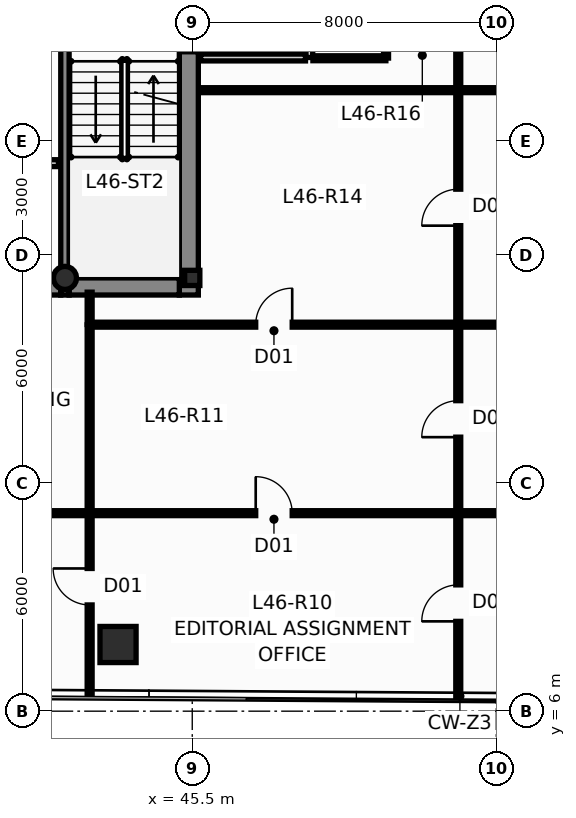
"""IFC4 building model, lengths in metres.
Left out: names, types, materials, properties, quantities, classifications, styles, units other than length and angle.
Written with IfcOpenShell. Run it as: python <this file> out.ifc"""

import sys

from ifc_helpers import new_model, si_unit, direction, frame, frame_2d, origin, origin_2d, place, context, subcontext, project, spatial, rectangle, hollow_rectangle, hollow_circle, i_section, extrude, source, transform, mapped, element, fill, save


model = new_model("IFC4")
c1 = context("Model", 3, precision=1e-05, world=origin(), true_north=direction((0.0, 1.0)))
c2 = subcontext(c1, "Body", "Model", "MODEL_VIEW")
j1 = project(units=[si_unit("LENGTHUNIT", "METRE"), si_unit("PLANEANGLEUNIT", "RADIAN")], contexts=[c1])
p1 = place(None, origin())
s1 = spatial("IfcSite", under=j1, at=p1, CompositionType="ELEMENT")
p2 = place(p1, origin())
s2 = spatial("IfcBuilding", under=s1, at=p2, CompositionType="ELEMENT")
p3 = place(p2, frame((0.0, 0.0, 176.75)))
s3 = spatial("IfcBuildingStorey", under=s2, at=p3, CompositionType="ELEMENT", Elevation=176.75)
m1 = source(origin(), c2, "Body", "SweptSolid", [
    extrude(i_section(OverallWidth=0.4, OverallDepth=0.4, WebThickness=0.02, FlangeThickness=0.032, at=origin_2d()), origin(), (0.0, 0.0, 1.0), 3.65),
])
p4 = place(p3, frame((45.5, 17.4, 0.0), z_axis=(0.0, 0.0, 1.0), x_axis=(1.0, 0.0, 0.0)))
e1 = element("IfcColumn", 1, at=p4, inside=s3, PredefinedType="COLUMN", context=c2, shape_type="MappedRepresentation", body=[
    mapped(m1, transform((0.0, 0.0, 0.0), scale=1.0)),
])
m2 = source(origin(), c2, "Body", "SweptSolid", [
    extrude(hollow_circle(Radius=0.305, WallThickness=0.025, at=origin_2d()), origin(), (0.0, 0.0, 1.0), 3.65),
])
p5 = place(p3, frame((42.15, 17.4, 0.0), z_axis=(0.0, 0.0, 1.0), x_axis=(1.0, 0.0, 0.0)))
e2 = element("IfcColumn", 2, at=p5, inside=s3, PredefinedType="COLUMN", context=c2, shape_type="MappedRepresentation", body=[
    mapped(m2, transform((0.0, 0.0, 0.0), scale=1.0)),
])
p6 = place(p3, frame((45.41, 16.95, 0.0), z_axis=(0.0, 0.0, 1.0), x_axis=(0.0, 1.0, 0.0)))
e3 = element("IfcWall", 3, at=p6, inside=s3, PredefinedType="SHEAR", context=c2, shape_type="SweptSolid", body=[
    extrude(rectangle(XDim=13.275, YDim=0.5, at=frame_2d((6.638, 0.0))), origin(), (0.0, 0.0, 1.0), 3.65),
])
p7 = place(p6, frame((6.4, 0.0, 0.0)))
e4 = element("IfcOpeningElement", 4, at=p7, cuts=e3, PredefinedType="OPENING", context=c2, shape_type="SweptSolid", body=[
    extrude(rectangle(XDim=1.12, YDim=2.15, at=frame_2d((0.56, 1.075))), frame((0.0, 0.262, 0.0), z_axis=(0.0, -1.0, 0.0), x_axis=(1.0, 0.0, 0.0)), (0.0, 0.0, 1.0), 0.524),
])
p8 = place(p6, frame((10.85, 0.0, 0.0)))
e5 = element("IfcOpeningElement", 5, at=p8, cuts=e3, PredefinedType="OPENING", context=c2, shape_type="SweptSolid", body=[
    extrude(rectangle(XDim=1.2, YDim=2.2, at=frame_2d((0.6, 1.1))), frame((0.0, 0.262, 0.0), z_axis=(0.0, -1.0, 0.0), x_axis=(1.0, 0.0, 0.0)), (0.0, 0.0, 1.0), 0.524),
])
p9 = place(p3, frame((33.96, 17.175, 0.0), z_axis=(0.0, 0.0, 1.0), x_axis=(1.0, 0.0, 0.0)))
e6 = element("IfcWall", 6, at=p9, inside=s3, PredefinedType="SHEAR", context=c2, shape_type="SweptSolid", body=[
    extrude(rectangle(XDim=8.08, YDim=0.45, at=frame_2d((4.04, 0.0))), origin(), (0.0, 0.0, 1.0), 3.65),
])
p10 = place(p3, frame((42.26, 17.175, 0.0), z_axis=(0.0, 0.0, 1.0), x_axis=(1.0, 0.0, 0.0)))
e7 = element("IfcWall", 7, at=p10, inside=s3, PredefinedType="SHEAR", context=c2, shape_type="SweptSolid", body=[
    extrude(rectangle(XDim=2.9, YDim=0.45, at=frame_2d((1.45, 0.0))), origin(), (0.0, 0.0, 1.0), 3.65),
])
p11 = place(p3, frame((42.15, 16.95, 0.0), z_axis=(0.0, 0.0, 1.0), x_axis=(0.0, 1.0, 0.0)))
e8 = element("IfcWall", 8, at=p11, inside=s3, PredefinedType="SHEAR", context=c2, shape_type="SweptSolid", body=[
    extrude(rectangle(XDim=13.275, YDim=0.22, at=frame_2d((6.638, 0.0))), origin(), (0.0, 0.0, 1.0), 3.65),
])
m3 = source(origin(), c2, "Body", "SweptSolid", [
    extrude(hollow_rectangle(XDim=0.95, YDim=0.95, WallThickness=0.05, at=origin_2d()), origin(), (0.0, 0.0, 1.0), 3.651),
])
p12 = place(p3, frame((43.547, 7.754, 0.0), z_axis=(0.004480682206, 0.019795252729, 0.999794014513), x_axis=(-0.975326687046, 0.220766513622, 0.0)))
e9 = element("IfcColumn", 9, at=p12, inside=s3, PredefinedType="COLUMN", context=c2, shape_type="MappedRepresentation", body=[
    mapped(m3, transform((0.0, 0.0, 0.0), scale=1.0)),
])
p13 = place(p3, frame((48.58, 23.2, 0.0), z_axis=(0.0, 0.0, 1.0), x_axis=(0.0, 1.0, 0.0)))
e10 = element("IfcWall", 10, at=p13, inside=s3, PredefinedType="PARTITIONING", context=c2, shape_type="SweptSolid", body=[
    extrude(rectangle(XDim=6.4, YDim=0.18, at=frame_2d((3.2, 0.0))), origin(), (0.0, 0.0, 1.0), 3.078),
])
p14 = place(p13, frame((2.65, 0.0, 0.0)))
e11 = element("IfcOpeningElement", 11, at=p14, cuts=e10, PredefinedType="OPENING", context=c2, shape_type="SweptSolid", body=[
    extrude(rectangle(XDim=1.05, YDim=2.15, at=frame_2d((0.525, 1.075))), frame((0.0, 0.102, 0.0), z_axis=(0.0, -1.0, 0.0), x_axis=(1.0, 0.0, 0.0)), (0.0, 0.0, 1.0), 0.204),
])
p15 = place(p3, frame((45.72, 23.2, 0.0), z_axis=(0.0, 0.0, 1.0), x_axis=(1.0, 0.0, 0.0)))
e12 = element("IfcWall", 12, at=p15, inside=s3, PredefinedType="PARTITIONING", context=c2, shape_type="SweptSolid", body=[
    extrude(rectangle(XDim=2.76, YDim=0.18, at=frame_2d((1.38, 0.0))), origin(), (0.0, 0.0, 1.0), 3.4),
])
p16 = place(p3, frame((40.22, 20.42, 0.0), z_axis=(0.0, 0.0, 1.0), x_axis=(1.0, 0.0, 0.0)))
e13 = element("IfcWall", 13, at=p16, inside=s3, PredefinedType="PARTITIONING", context=c2, shape_type="SweptSolid", body=[
    extrude(rectangle(XDim=1.76, YDim=0.18, at=frame_2d((0.88, 0.0))), origin(), (0.0, 0.0, 1.0), 3.4),
])
p17 = place(p3, frame((52.505, 11.21, 0.0), z_axis=(0.0, 0.0, 1.0), x_axis=(1.0, 0.0, 0.0)))
e14 = element("IfcWall", 14, at=p17, inside=s3, PredefinedType="PARTITIONING", context=c2, shape_type="SweptSolid", body=[
    extrude(rectangle(XDim=11.092, YDim=0.13, at=frame_2d((5.546, 0.0))), origin(), (0.0, 0.0, 1.0), 3.4),
])
p18 = place(p3, frame((52.505, 16.17, 0.0), z_axis=(0.0, 0.0, 1.0), x_axis=(1.0, 0.0, 0.0)))
e15 = element("IfcWall", 15, at=p18, inside=s3, PredefinedType="PARTITIONING", context=c2, shape_type="SweptSolid", body=[
    extrude(rectangle(XDim=10.259, YDim=0.13, at=frame_2d((5.129, 0.0))), origin(), (0.0, 0.0, 1.0), 3.4),
])
p19 = place(p3, frame((42.805, 11.21, 0.0), z_axis=(0.0, 0.0, 1.0), x_axis=(1.0, 0.0, 0.0)))
e16 = element("IfcWall", 16, at=p19, inside=s3, PredefinedType="PARTITIONING", context=c2, shape_type="SweptSolid", body=[
    extrude(rectangle(XDim=9.69, YDim=0.13, at=frame_2d((4.845, 0.0))), origin(), (0.0, 0.0, 1.0), 3.078),
])
p20 = place(p19, frame((4.365, 0.0, 0.0)))
e17 = element("IfcOpeningElement", 17, at=p20, cuts=e16, PredefinedType="OPENING", context=c2, shape_type="SweptSolid", body=[
    extrude(rectangle(XDim=0.96, YDim=2.15, at=frame_2d((0.48, 1.075))), frame((0.0, 0.077, 0.0), z_axis=(0.0, -1.0, 0.0), x_axis=(1.0, 0.0, 0.0)), (0.0, 0.0, 1.0), 0.154),
])
p21 = place(p3, frame((42.805, 16.17, 0.0), z_axis=(0.0, 0.0, 1.0), x_axis=(1.0, 0.0, 0.0)))
e18 = element("IfcWall", 18, at=p21, inside=s3, PredefinedType="PARTITIONING", context=c2, shape_type="SweptSolid", body=[
    extrude(rectangle(XDim=9.69, YDim=0.13, at=frame_2d((4.845, 0.0))), origin(), (0.0, 0.0, 1.0), 3.078),
])
p22 = place(p21, frame((4.365, 0.0, 0.0)))
e19 = element("IfcOpeningElement", 19, at=p22, cuts=e18, PredefinedType="OPENING", context=c2, shape_type="SweptSolid", body=[
    extrude(rectangle(XDim=0.96, YDim=2.15, at=frame_2d((0.48, 1.075))), frame((0.0, 0.077, 0.0), z_axis=(0.0, -1.0, 0.0), x_axis=(1.0, 0.0, 0.0)), (0.0, 0.0, 1.0), 0.154),
])
p23 = place(p3, frame((33.205, 11.21, 0.0), z_axis=(0.0, 0.0, 1.0), x_axis=(1.0, 0.0, 0.0)))
e20 = element("IfcWall", 20, at=p23, inside=s3, PredefinedType="PARTITIONING", context=c2, shape_type="SweptSolid", body=[
    extrude(rectangle(XDim=9.59, YDim=0.13, at=frame_2d((4.795, 0.0))), origin(), (0.0, 0.0, 1.0), 3.078),
])
p24 = place(p23, frame((4.315, 0.0, 0.0)))
e21 = element("IfcOpeningElement", 21, at=p24, cuts=e20, PredefinedType="OPENING", context=c2, shape_type="SweptSolid", body=[
    extrude(rectangle(XDim=0.96, YDim=2.15, at=frame_2d((0.48, 1.075))), frame((0.0, 0.077, 0.0), z_axis=(0.0, -1.0, 0.0), x_axis=(1.0, 0.0, 0.0)), (0.0, 0.0, 1.0), 0.154),
])
p25 = place(p3, frame((45.675, 22.34, 0.0), z_axis=(0.0, 0.0, 1.0), x_axis=(1.0, 0.0, 0.0)))
e22 = element("IfcWall", 22, at=p25, inside=s3, PredefinedType="PARTITIONING", context=c2, shape_type="SweptSolid", body=[
    extrude(rectangle(XDim=6.82, YDim=0.13, at=frame_2d((3.41, 0.0))), origin(), (0.0, 0.0, 1.0), 3.4),
])
p26 = place(p3, frame((52.505, 22.34, 0.0), z_axis=(0.0, 0.0, 1.0), x_axis=(1.0, 0.0, 0.0)))
e23 = element("IfcWall", 23, at=p26, inside=s3, PredefinedType="PARTITIONING", context=c2, shape_type="SweptSolid", body=[
    extrude(rectangle(XDim=6.564, YDim=0.13, at=frame_2d((3.282, 0.0))), origin(), (0.0, 0.0, 1.0), 3.4),
])
p27 = place(p3, frame((52.5, 16.175, 0.0), z_axis=(0.0, 0.0, 1.0), x_axis=(0.0, 1.0, 0.0)))
e24 = element("IfcWall", 24, at=p27, inside=s3, PredefinedType="PARTITIONING", context=c2, shape_type="SweptSolid", body=[
    extrude(rectangle(XDim=6.16, YDim=0.13, at=frame_2d((3.08, 0.0))), origin(), (0.0, 0.0, 1.0), 3.078),
])
p28 = place(p27, frame((2.6, 0.0, 0.0)))
e25 = element("IfcOpeningElement", 25, at=p28, cuts=e24, PredefinedType="OPENING", context=c2, shape_type="SweptSolid", body=[
    extrude(rectangle(XDim=0.96, YDim=2.15, at=frame_2d((0.48, 1.075))), frame((0.0, 0.077, 0.0), z_axis=(0.0, -1.0, 0.0), x_axis=(1.0, 0.0, 0.0)), (0.0, 0.0, 1.0), 0.154),
])
p29 = place(p3, frame((42.8, 11.215, 0.0), z_axis=(0.0, 0.0, 1.0), x_axis=(0.0, 1.0, 0.0)))
e26 = element("IfcWall", 26, at=p29, inside=s3, PredefinedType="PARTITIONING", context=c2, shape_type="SweptSolid", body=[
    extrude(rectangle(XDim=4.95, YDim=0.13, at=frame_2d((2.475, 0.0))), origin(), (0.0, 0.0, 1.0), 3.4),
])
p30 = place(p3, frame((52.5, 11.215, 0.0), z_axis=(0.0, 0.0, 1.0), x_axis=(0.0, 1.0, 0.0)))
e27 = element("IfcWall", 27, at=p30, inside=s3, PredefinedType="PARTITIONING", context=c2, shape_type="SweptSolid", body=[
    extrude(rectangle(XDim=4.95, YDim=0.13, at=frame_2d((2.475, 0.0))), origin(), (0.0, 0.0, 1.0), 3.4),
])
p31 = place(p30, frame((1.995, 0.0, 0.0)))
e28 = element("IfcOpeningElement", 28, at=p31, cuts=e27, PredefinedType="OPENING", context=c2, shape_type="SweptSolid", body=[
    extrude(rectangle(XDim=0.96, YDim=2.15, at=frame_2d((0.48, 1.075))), frame((0.0, 0.077, 0.0), z_axis=(0.0, -1.0, 0.0), x_axis=(1.0, 0.0, 0.0)), (0.0, 0.0, 1.0), 0.154),
])
p32 = place(p3, frame((52.5, 6.39, 0.0), z_axis=(0.0, 0.0, 1.0), x_axis=(0.0, 1.0, 0.0)))
e29 = element("IfcWall", 29, at=p32, inside=s3, PredefinedType="PARTITIONING", context=c2, shape_type="SweptSolid", body=[
    extrude(rectangle(XDim=4.815, YDim=0.13, at=frame_2d((2.407, 0.0))), origin(), (0.0, 0.0, 1.0), 3.4),
])
p33 = place(p32, frame((1.973, 0.0, 0.0)))
e30 = element("IfcOpeningElement", 30, at=p33, cuts=e29, PredefinedType="OPENING", context=c2, shape_type="SweptSolid", body=[
    extrude(rectangle(XDim=0.96, YDim=2.15, at=frame_2d((0.48, 1.075))), frame((0.0, 0.077, 0.0), z_axis=(0.0, -1.0, 0.0), x_axis=(1.0, 0.0, 0.0)), (0.0, 0.0, 1.0), 0.154),
])
p34 = place(p3, frame((42.8, 6.455, 0.0), z_axis=(0.0, 0.0, 1.0), x_axis=(0.0, 1.0, 0.0)))
e31 = element("IfcWall", 31, at=p34, inside=s3, PredefinedType="PARTITIONING", context=c2, shape_type="SweptSolid", body=[
    extrude(rectangle(XDim=4.75, YDim=0.13, at=frame_2d((2.375, 0.0))), origin(), (0.0, 0.0, 1.0), 3.4),
])
p35 = place(p34, frame((2.34, 0.0, 0.0)))
e32 = element("IfcOpeningElement", 32, at=p35, cuts=e31, PredefinedType="OPENING", context=c2, shape_type="SweptSolid", body=[
    extrude(rectangle(XDim=0.96, YDim=2.15, at=frame_2d((0.48, 1.075))), frame((0.0, 0.077, 0.0), z_axis=(0.0, -1.0, 0.0), x_axis=(1.0, 0.0, 0.0)), (0.0, 0.0, 1.0), 0.154),
])
p36 = place(p3, frame((52.5, 26.095, 0.0), z_axis=(0.0, 0.0, 1.0), x_axis=(0.0, -1.0, 0.0)))
e33 = element("IfcWall", 33, at=p36, inside=s3, PredefinedType="PARTITIONING", context=c2, shape_type="SweptSolid", body=[
    extrude(rectangle(XDim=3.75, YDim=0.13, at=frame_2d((1.875, 0.0))), origin(), (0.0, 0.0, 1.0), 3.078),
])
p37 = place(p3, frame((50.6, 23.185, 0.0), z_axis=(0.0, 0.0, 1.0), x_axis=(0.0, 1.0, 0.0)))
e34 = element("IfcWall", 34, at=p37, inside=s3, PredefinedType="PARTITIONING", context=c2, shape_type="SweptSolid", body=[
    extrude(rectangle(XDim=2.91, YDim=0.13, at=frame_2d((1.455, 0.0))), origin(), (0.0, 0.0, 1.0), 3.078),
])
p38 = place(p37, frame((0.975, 0.0, 0.0)))
e35 = element("IfcOpeningElement", 35, at=p38, cuts=e34, PredefinedType="OPENING", context=c2, shape_type="SweptSolid", body=[
    extrude(rectangle(XDim=0.96, YDim=2.15, at=frame_2d((0.48, 1.075))), frame((0.0, 0.077, 0.0), z_axis=(0.0, -1.0, 0.0), x_axis=(1.0, 0.0, 0.0)), (0.0, 0.0, 1.0), 0.154),
])
p39 = place(p3, frame((48.675, 23.18, 0.0), z_axis=(0.0, 0.0, 1.0), x_axis=(1.0, 0.0, 0.0)))
e36 = element("IfcWall", 36, at=p39, inside=s3, PredefinedType="PARTITIONING", context=c2, shape_type="SweptSolid", body=[
    extrude(rectangle(XDim=1.92, YDim=0.13, at=frame_2d((0.96, 0.0))), origin(), (0.0, 0.0, 1.0), 3.4),
])
p40 = place(p3, frame((42.8, 16.175, 0.0), z_axis=(0.0, 0.0, 1.0), x_axis=(0.0, 1.0, 0.0)))
e37 = element("IfcWall", 37, at=p40, inside=s3, PredefinedType="PARTITIONING", context=c2, shape_type="SweptSolid", body=[
    extrude(rectangle(XDim=0.85, YDim=0.13, at=frame_2d((0.425, 0.0))), origin(), (0.0, 0.0, 1.0), 3.4),
])
p41 = place(p20, origin())
e38 = element("IfcDoor", 38, at=p41, inside=s3, OperationType="SINGLE_SWING_LEFT", PredefinedType="DOOR", context=c2, shape_type="SweptSolid", body=[
    extrude(rectangle(XDim=0.96, YDim=2.15, at=frame_2d((0.48, 1.075))), frame((0.0, 0.025, 0.0), z_axis=(0.0, -1.0, 0.0), x_axis=(1.0, 0.0, 0.0)), (0.0, 0.0, 1.0), 0.05),
])
fill(e17, e38)
p42 = place(p22, origin())
e39 = element("IfcDoor", 39, at=p42, inside=s3, OperationType="SINGLE_SWING_RIGHT", PredefinedType="DOOR", context=c2, shape_type="SweptSolid", body=[
    extrude(rectangle(XDim=0.96, YDim=2.15, at=frame_2d((0.48, 1.075))), frame((0.0, 0.025, 0.0), z_axis=(0.0, -1.0, 0.0), x_axis=(1.0, 0.0, 0.0)), (0.0, 0.0, 1.0), 0.05),
])
fill(e19, e39)
p43 = place(p28, origin())
e40 = element("IfcDoor", 40, at=p43, inside=s3, OperationType="SINGLE_SWING_LEFT", PredefinedType="DOOR", context=c2, shape_type="SweptSolid", body=[
    extrude(rectangle(XDim=0.96, YDim=2.15, at=frame_2d((0.48, 1.075))), frame((0.0, 0.025, 0.0), z_axis=(0.0, -1.0, 0.0), x_axis=(1.0, 0.0, 0.0)), (0.0, 0.0, 1.0), 0.05),
])
fill(e25, e40)
p44 = place(p31, origin())
e41 = element("IfcDoor", 41, at=p44, inside=s3, OperationType="SINGLE_SWING_LEFT", PredefinedType="DOOR", context=c2, shape_type="SweptSolid", body=[
    extrude(rectangle(XDim=0.96, YDim=2.15, at=frame_2d((0.48, 1.075))), frame((0.0, 0.025, 0.0), z_axis=(0.0, -1.0, 0.0), x_axis=(1.0, 0.0, 0.0)), (0.0, 0.0, 1.0), 0.05),
])
fill(e28, e41)
p45 = place(p33, origin())
e42 = element("IfcDoor", 42, at=p45, inside=s3, OperationType="SINGLE_SWING_LEFT", PredefinedType="DOOR", context=c2, shape_type="SweptSolid", body=[
    extrude(rectangle(XDim=0.96, YDim=2.15, at=frame_2d((0.48, 1.075))), frame((0.0, 0.025, 0.0), z_axis=(0.0, -1.0, 0.0), x_axis=(1.0, 0.0, 0.0)), (0.0, 0.0, 1.0), 0.05),
])
fill(e30, e42)
p46 = place(p35, origin())
e43 = element("IfcDoor", 43, at=p46, inside=s3, OperationType="SINGLE_SWING_RIGHT", PredefinedType="DOOR", context=c2, shape_type="SweptSolid", body=[
    extrude(rectangle(XDim=0.96, YDim=2.15, at=frame_2d((0.48, 1.075))), frame((0.0, 0.025, 0.0), z_axis=(0.0, -1.0, 0.0), x_axis=(1.0, 0.0, 0.0)), (0.0, 0.0, 1.0), 0.05),
])
fill(e32, e43)
save(model, sys.argv[1])
